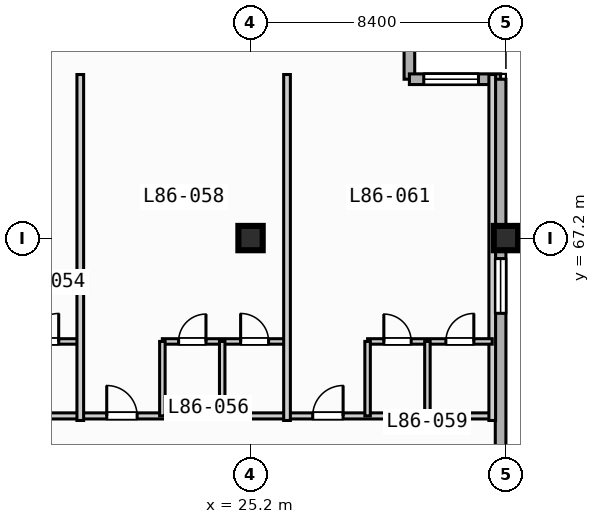
"""IFC4 building model, lengths in metres.
Left out: names, types, materials, properties, quantities, classifications, styles, units other than length and angle.
Written with IfcOpenShell. Run it as: python <this file> out.ifc"""

import sys

from ifc_helpers import new_model, si_unit, direction, frame, frame_2d, origin, origin_2d, place, context, subcontext, project, spatial, rectangle, extrude, element, fill, save


model = new_model("IFC4")
c1 = context("Model", 3, precision=1e-05, world=origin(), true_north=direction((0.0, 1.0)))
c2 = subcontext(c1, "Body", "Model", "MODEL_VIEW")
j1 = project(units=[si_unit("LENGTHUNIT", "METRE"), si_unit("PLANEANGLEUNIT", "RADIAN")], contexts=[c1])
p1 = place(None, origin())
s1 = spatial("IfcSite", under=j1, at=p1, CompositionType="ELEMENT")
p2 = place(p1, origin())
s2 = spatial("IfcBuilding", under=s1, at=p2, CompositionType="ELEMENT")
p3 = place(p2, frame((0.0, 0.0, 347.6)))
s3 = spatial("IfcBuildingStorey", under=s2, at=p3, CompositionType="ELEMENT", Elevation=347.6)
for number, where, z_axis, x_axis in (
    (1, (25.2, 67.2, 0.0), (0.0, 0.0, 1.0), (1.0, 0.0, 0.0)),
    (2, (33.6, 67.2, 0.0), (0.0, 0.0, 1.0), (1.0, 0.0, 0.0)),
):
    element("IfcColumn", number, at=place(p3, frame(where, z_axis=z_axis, x_axis=x_axis)), inside=s3, PredefinedType="COLUMN", context=c2, shape_type="SweptSolid", body=[
        extrude(rectangle(XDim=0.8, YDim=0.8, at=origin_2d()), origin(), (0.0, 0.0, 1.0), 3.9),
    ])
p4 = place(p3, frame((30.425, 75.425, 0.0), z_axis=(0.0, 0.0, 1.0), x_axis=(0.0, -1.0, 0.0)))
e3 = element("IfcWall", 3, at=p4, inside=s3, PredefinedType="STANDARD", context=c2, shape_type="SweptSolid", body=[
    extrude(rectangle(XDim=3.0, YDim=0.35, at=frame_2d((1.5, 0.0))), origin(), (0.0, 0.0, 1.0), 3.67),
])
p5 = place(p3, frame((30.425, 72.425, 0.0), z_axis=(0.0, 0.0, 1.0), x_axis=(1.0, 0.0, 0.0)))
e4 = element("IfcWall", 4, at=p5, inside=s3, PredefinedType="STANDARD", context=c2, shape_type="SweptSolid", body=[
    extrude(rectangle(XDim=3.0, YDim=0.35, at=frame_2d((1.5, 0.0))), origin(), (0.0, 0.0, 1.0), 3.67),
])
p6 = place(p5, frame((0.472, 0.0, 0.85)))
e5 = element("IfcOpeningElement", 5, at=p6, cuts=e4, PredefinedType="OPENING", context=c2, shape_type="SweptSolid", body=[
    extrude(rectangle(XDim=1.8, YDim=1.8, at=frame_2d((0.9, 0.9))), frame((0.0, 0.185, 0.0), z_axis=(0.0, -1.0, 0.0), x_axis=(1.0, 0.0, 0.0)), (0.0, 0.0, 1.0), 0.37),
])
p7 = place(p3, frame((33.425, 72.425, 0.0), z_axis=(0.0, 0.0, 1.0), x_axis=(0.0, -1.0, 0.0)))
e6 = element("IfcWall", 6, at=p7, inside=s3, PredefinedType="STANDARD", context=c2, shape_type="SweptSolid", body=[
    extrude(rectangle(XDim=39.0, YDim=0.35, at=frame_2d((19.5, 0.0))), origin(), (0.0, 0.0, 1.0), 3.67),
])
p8 = place(p7, frame((5.9, 0.0, 0.85)))
e7 = element("IfcOpeningElement", 7, at=p8, cuts=e6, PredefinedType="OPENING", context=c2, shape_type="SweptSolid", body=[
    extrude(rectangle(XDim=1.8, YDim=1.8, at=frame_2d((0.9, 0.9))), frame((0.0, 0.185, 0.0), z_axis=(0.0, -1.0, 0.0), x_axis=(1.0, 0.0, 0.0)), (0.0, 0.0, 1.0), 0.37),
])
p9 = place(p3, frame((11.8, 61.35, 0.0), z_axis=(0.0, 0.0, 1.0), x_axis=(1.0, 0.0, 0.0)))
e8 = element("IfcWall", 8, at=p9, inside=s3, PredefinedType="PARTITIONING", context=c2, shape_type="SweptSolid", body=[
    extrude(rectangle(XDim=21.35, YDim=0.2, at=frame_2d((10.675, 0.0))), origin(), (0.0, 0.0, 1.0), 3.67),
])
p10 = place(p9, frame((1.17, 0.0, 0.0)))
e9 = element("IfcOpeningElement", 9, at=p10, cuts=e8, PredefinedType="OPENING", context=c2, shape_type="SweptSolid", body=[
    extrude(rectangle(XDim=1.0, YDim=2.15, at=frame_2d((0.5, 1.075))), frame((0.0, 0.11, 0.0), z_axis=(0.0, -1.0, 0.0), x_axis=(1.0, 0.0, 0.0)), (0.0, 0.0, 1.0), 0.22),
])
p11 = place(p9, frame((8.67, 0.0, 0.0)))
e10 = element("IfcOpeningElement", 10, at=p11, cuts=e8, PredefinedType="OPENING", context=c2, shape_type="SweptSolid", body=[
    extrude(rectangle(XDim=1.0, YDim=2.15, at=frame_2d((0.5, 1.075))), frame((0.0, 0.11, 0.0), z_axis=(0.0, -1.0, 0.0), x_axis=(1.0, 0.0, 0.0)), (0.0, 0.0, 1.0), 0.22),
])
p12 = place(p9, frame((15.445, 0.0, 0.0)))
e11 = element("IfcOpeningElement", 11, at=p12, cuts=e8, PredefinedType="OPENING", context=c2, shape_type="SweptSolid", body=[
    extrude(rectangle(XDim=1.0, YDim=2.15, at=frame_2d((0.5, 1.075))), frame((0.0, 0.11, 0.0), z_axis=(0.0, -1.0, 0.0), x_axis=(1.0, 0.0, 0.0)), (0.0, 0.0, 1.0), 0.22),
])
p13 = place(p3, frame((15.1, 63.8, 0.0), z_axis=(0.0, 0.0, 1.0), x_axis=(1.0, 0.0, 0.0)))
e12 = element("IfcWall", 12, at=p13, inside=s3, PredefinedType="PLUMBINGWALL", context=c2, shape_type="SweptSolid", body=[
    extrude(rectangle(XDim=4.5, YDim=0.18, at=frame_2d((2.25, 0.0))), origin(), (0.0, 0.0, 1.0), 3.67),
])
p14 = place(p13, frame((0.63, 0.0, 0.0)))
e13 = element("IfcOpeningElement", 13, at=p14, cuts=e12, PredefinedType="OPENING", context=c2, shape_type="SweptSolid", body=[
    extrude(rectangle(XDim=0.9, YDim=2.1, at=frame_2d((0.45, 1.05))), frame((0.0, 0.1, 0.0), z_axis=(0.0, -1.0, 0.0), x_axis=(1.0, 0.0, 0.0)), (0.0, 0.0, 1.0), 0.2),
])
p15 = place(p13, frame((2.87, 0.0, 0.0)))
e14 = element("IfcOpeningElement", 14, at=p15, cuts=e12, PredefinedType="OPENING", context=c2, shape_type="SweptSolid", body=[
    extrude(rectangle(XDim=0.92, YDim=2.1, at=frame_2d((0.46, 1.05))), frame((0.0, 0.1, 0.0), z_axis=(0.0, -1.0, 0.0), x_axis=(1.0, 0.0, 0.0)), (0.0, 0.0, 1.0), 0.2),
])
p16 = place(p3, frame((19.6, 61.2, 0.0), z_axis=(0.0, 0.0, 1.0), x_axis=(0.0, 1.0, 0.0)))
e15 = element("IfcWall", 15, at=p16, inside=s3, PredefinedType="PARTITIONING", context=c2, shape_type="SweptSolid", body=[
    extrude(rectangle(XDim=11.38, YDim=0.22, at=frame_2d((5.69, 0.0))), origin(), (0.0, 0.0, 1.0), 3.67),
])
p17 = place(p3, frame((22.3, 63.8, 0.0), z_axis=(0.0, 0.0, 1.0), x_axis=(1.0, 0.0, 0.0)))
e16 = element("IfcWall", 16, at=p17, inside=s3, PredefinedType="PLUMBINGWALL", context=c2, shape_type="SweptSolid", body=[
    extrude(rectangle(XDim=4.1, YDim=0.18, at=frame_2d((2.05, 0.0))), origin(), (0.0, 0.0, 1.0), 3.67),
])
p18 = place(p17, frame((0.534, 0.0, 0.0)))
e17 = element("IfcOpeningElement", 17, at=p18, cuts=e16, PredefinedType="OPENING", context=c2, shape_type="SweptSolid", body=[
    extrude(rectangle(XDim=0.9, YDim=2.1, at=frame_2d((0.45, 1.05))), frame((0.0, 0.1, 0.0), z_axis=(0.0, -1.0, 0.0), x_axis=(1.0, 0.0, 0.0)), (0.0, 0.0, 1.0), 0.2),
])
p19 = place(p17, frame((2.574, 0.0, 0.0)))
e18 = element("IfcOpeningElement", 18, at=p19, cuts=e16, PredefinedType="OPENING", context=c2, shape_type="SweptSolid", body=[
    extrude(rectangle(XDim=0.92, YDim=2.1, at=frame_2d((0.46, 1.05))), frame((0.0, 0.1, 0.0), z_axis=(0.0, -1.0, 0.0), x_axis=(1.0, 0.0, 0.0)), (0.0, 0.0, 1.0), 0.2),
])
for number, where, z_axis, x_axis in (
    (19, (22.3, 61.35, 0.0), (0.0, 0.0, 1.0), (0.0, 1.0, 0.0)),
    (20, (24.268, 61.35, 0.0), (0.0, 0.0, 1.0), (0.0, 1.0, 0.0)),
):
    element("IfcWall", number, at=place(p3, frame(where, z_axis=z_axis, x_axis=x_axis)), inside=s3, PredefinedType="PLUMBINGWALL", context=c2, shape_type="SweptSolid", body=[
        extrude(rectangle(XDim=2.45, YDim=0.18, at=frame_2d((1.225, 0.0))), origin(), (0.0, 0.0, 1.0), 3.67),
    ])
for number, where, z_axis, x_axis in (
    (21, (26.4, 61.2, 0.0), (0.0, 0.0, 1.0), (0.0, 1.0, 0.0)),
    (22, (33.15, 61.2, 0.0), (0.0, 0.0, 1.0), (0.0, 1.0, 0.0)),
):
    element("IfcWall", number, at=place(p3, frame(where, z_axis=z_axis, x_axis=x_axis)), inside=s3, PredefinedType="PARTITIONING", context=c2, shape_type="SweptSolid", body=[
        extrude(rectangle(XDim=11.38, YDim=0.22, at=frame_2d((5.69, 0.0))), origin(), (0.0, 0.0, 1.0), 3.67),
    ])
p20 = place(p3, frame((29.05, 63.8, 0.0), z_axis=(0.0, 0.0, 1.0), x_axis=(1.0, 0.0, 0.0)))
e23 = element("IfcWall", 23, at=p20, inside=s3, PredefinedType="PLUMBINGWALL", context=c2, shape_type="SweptSolid", body=[
    extrude(rectangle(XDim=4.1, YDim=0.18, at=frame_2d((2.05, 0.0))), origin(), (0.0, 0.0, 1.0), 3.67),
])
p21 = place(p20, frame((0.534, 0.0, 0.0)))
e24 = element("IfcOpeningElement", 24, at=p21, cuts=e23, PredefinedType="OPENING", context=c2, shape_type="SweptSolid", body=[
    extrude(rectangle(XDim=0.9, YDim=2.1, at=frame_2d((0.45, 1.05))), frame((0.0, 0.1, 0.0), z_axis=(0.0, -1.0, 0.0), x_axis=(1.0, 0.0, 0.0)), (0.0, 0.0, 1.0), 0.2),
])
p22 = place(p20, frame((2.574, 0.0, 0.0)))
e25 = element("IfcOpeningElement", 25, at=p22, cuts=e23, PredefinedType="OPENING", context=c2, shape_type="SweptSolid", body=[
    extrude(rectangle(XDim=0.92, YDim=2.1, at=frame_2d((0.46, 1.05))), frame((0.0, 0.1, 0.0), z_axis=(0.0, -1.0, 0.0), x_axis=(1.0, 0.0, 0.0)), (0.0, 0.0, 1.0), 0.2),
])
for number, where, z_axis, x_axis in (
    (26, (29.05, 61.35, 0.0), (0.0, 0.0, 1.0), (0.0, 1.0, 0.0)),
    (27, (31.018, 61.35, 0.0), (0.0, 0.0, 1.0), (0.0, 1.0, 0.0)),
):
    element("IfcWall", number, at=place(p3, frame(where, z_axis=z_axis, x_axis=x_axis)), inside=s3, PredefinedType="PLUMBINGWALL", context=c2, shape_type="SweptSolid", body=[
        extrude(rectangle(XDim=2.45, YDim=0.18, at=frame_2d((1.225, 0.0))), origin(), (0.0, 0.0, 1.0), 3.67),
    ])
p23 = place(p6, origin())
e28 = element("IfcWindow", 28, at=p23, inside=s3, PartitioningType="SINGLE_PANEL", PredefinedType="WINDOW", context=c2, shape_type="SweptSolid", body=[
    extrude(rectangle(XDim=1.8, YDim=1.8, at=frame_2d((0.9, 0.9))), frame((0.0, 0.03, 0.0), z_axis=(0.0, -1.0, 0.0), x_axis=(1.0, 0.0, 0.0)), (0.0, 0.0, 1.0), 0.06),
])
fill(e5, e28)
p24 = place(p8, origin())
e29 = element("IfcWindow", 29, at=p24, inside=s3, PartitioningType="SINGLE_PANEL", PredefinedType="WINDOW", context=c2, shape_type="SweptSolid", body=[
    extrude(rectangle(XDim=1.8, YDim=1.8, at=frame_2d((0.9, 0.9))), frame((0.0, 0.03, 0.0), z_axis=(0.0, -1.0, 0.0), x_axis=(1.0, 0.0, 0.0)), (0.0, 0.0, 1.0), 0.06),
])
fill(e7, e29)
p25 = place(p11, origin())
e30 = element("IfcDoor", 30, at=p25, inside=s3, OperationType="SINGLE_SWING_LEFT", PredefinedType="DOOR", context=c2, shape_type="SweptSolid", body=[
    extrude(rectangle(XDim=1.0, YDim=2.15, at=frame_2d((0.5, 1.075))), frame((0.0, 0.025, 0.0), z_axis=(0.0, -1.0, 0.0), x_axis=(1.0, 0.0, 0.0)), (0.0, 0.0, 1.0), 0.05),
])
fill(e10, e30)
p26 = place(p12, origin())
e31 = element("IfcDoor", 31, at=p26, inside=s3, OperationType="SINGLE_SWING_RIGHT", PredefinedType="DOOR", context=c2, shape_type="SweptSolid", body=[
    extrude(rectangle(XDim=1.0, YDim=2.15, at=frame_2d((0.5, 1.075))), frame((0.0, 0.025, 0.0), z_axis=(0.0, -1.0, 0.0), x_axis=(1.0, 0.0, 0.0)), (0.0, 0.0, 1.0), 0.05),
])
fill(e11, e31)
p27 = place(p15, origin())
e32 = element("IfcDoor", 32, at=p27, inside=s3, OperationType="SINGLE_SWING_RIGHT", PredefinedType="DOOR", context=c2, shape_type="SweptSolid", body=[
    extrude(rectangle(XDim=0.92, YDim=2.1, at=frame_2d((0.46, 1.05))), frame((0.0, 0.025, 0.0), z_axis=(0.0, -1.0, 0.0), x_axis=(1.0, 0.0, 0.0)), (0.0, 0.0, 1.0), 0.05),
])
fill(e14, e32)
p28 = place(p18, origin())
e33 = element("IfcDoor", 33, at=p28, inside=s3, OperationType="SINGLE_SWING_RIGHT", PredefinedType="DOOR", context=c2, shape_type="SweptSolid", body=[
    extrude(rectangle(XDim=0.9, YDim=2.1, at=frame_2d((0.45, 1.05))), frame((0.0, 0.025, 0.0), z_axis=(0.0, -1.0, 0.0), x_axis=(1.0, 0.0, 0.0)), (0.0, 0.0, 1.0), 0.05),
])
fill(e17, e33)
p29 = place(p19, origin())
e34 = element("IfcDoor", 34, at=p29, inside=s3, OperationType="SINGLE_SWING_LEFT", PredefinedType="DOOR", context=c2, shape_type="SweptSolid", body=[
    extrude(rectangle(XDim=0.92, YDim=2.1, at=frame_2d((0.46, 1.05))), frame((0.0, 0.025, 0.0), z_axis=(0.0, -1.0, 0.0), x_axis=(1.0, 0.0, 0.0)), (0.0, 0.0, 1.0), 0.05),
])
fill(e18, e34)
p30 = place(p21, origin())
e35 = element("IfcDoor", 35, at=p30, inside=s3, OperationType="SINGLE_SWING_LEFT", PredefinedType="DOOR", context=c2, shape_type="SweptSolid", body=[
    extrude(rectangle(XDim=0.9, YDim=2.1, at=frame_2d((0.45, 1.05))), frame((0.0, 0.025, 0.0), z_axis=(0.0, -1.0, 0.0), x_axis=(1.0, 0.0, 0.0)), (0.0, 0.0, 1.0), 0.05),
])
fill(e24, e35)
p31 = place(p22, origin())
e36 = element("IfcDoor", 36, at=p31, inside=s3, OperationType="SINGLE_SWING_RIGHT", PredefinedType="DOOR", context=c2, shape_type="SweptSolid", body=[
    extrude(rectangle(XDim=0.92, YDim=2.1, at=frame_2d((0.46, 1.05))), frame((0.0, 0.025, 0.0), z_axis=(0.0, -1.0, 0.0), x_axis=(1.0, 0.0, 0.0)), (0.0, 0.0, 1.0), 0.05),
])
fill(e25, e36)
save(model, sys.argv[1])
